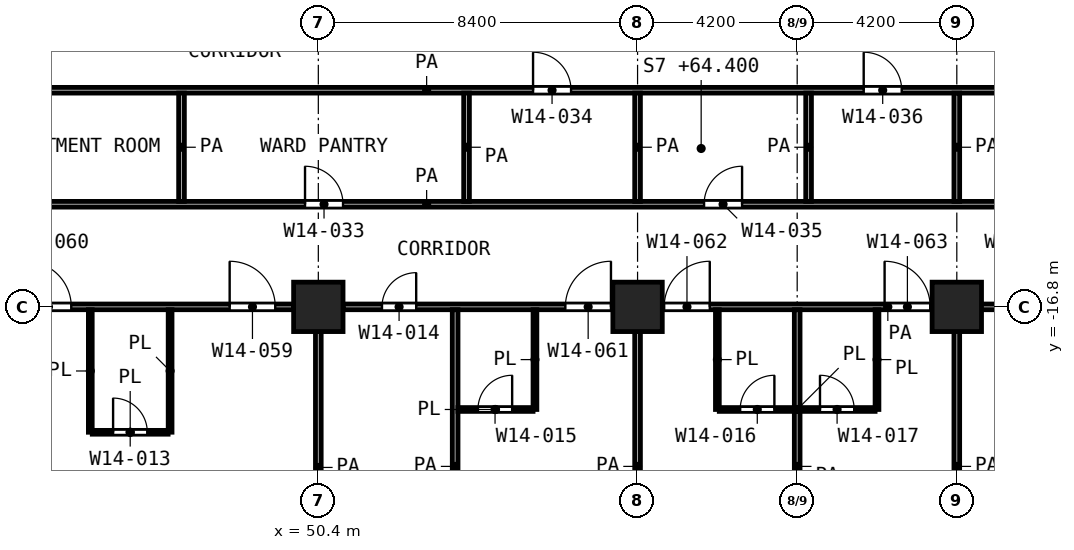
"""IFC4 building model, lengths in metres.
Left out: names, types, materials, properties, quantities, classifications, styles, units other than length and angle.
Written with IfcOpenShell. Run it as: python <this file> out.ifc"""

import sys

from ifc_helpers import new_model, si_unit, direction, frame, frame_2d, origin, origin_2d, place, context, subcontext, project, spatial, rectangle, extrude, element, fill, save


model = new_model("IFC4")
c1 = context("Model", 3, precision=1e-05, world=origin(), true_north=direction((0.0, 1.0)))
c2 = subcontext(c1, "Body", "Model", "MODEL_VIEW")
j1 = project(units=[si_unit("LENGTHUNIT", "METRE"), si_unit("PLANEANGLEUNIT", "RADIAN")], contexts=[c1])
p1 = place(None, origin())
s1 = spatial("IfcSite", under=j1, at=p1, CompositionType="ELEMENT")
p2 = place(p1, origin())
s2 = spatial("IfcBuilding", under=s1, at=p2, CompositionType="ELEMENT")
p3 = place(p2, frame((0.0, 0.0, 64.4)))
s3 = spatial("IfcBuildingStorey", under=s2, at=p3, CompositionType="ELEMENT", Elevation=64.4)
for number, where, z_axis, x_axis in (
    (1, (50.4, -16.8, 0.0), (0.0, 0.0, 1.0), (1.0, 0.0, 0.0)),
    (2, (58.8, -16.8, 0.0), (0.0, 0.0, 1.0), (1.0, 0.0, 0.0)),
    (3, (67.2, -16.8, 0.0), (0.0, 0.0, 1.0), (1.0, 0.0, 0.0)),
):
    element("IfcColumn", number, at=place(p3, frame(where, z_axis=z_axis, x_axis=x_axis)), inside=s3, PredefinedType="COLUMN", context=c2, shape_type="SweptSolid", body=[
        extrude(rectangle(XDim=1.3, YDim=1.3, at=origin_2d()), origin(), (0.0, 0.0, 1.0), 4.2),
    ])
p4 = place(p3, frame((44.452, -20.1, 0.0), z_axis=(0.0, 0.0, 1.0), x_axis=(1.0, 0.0, 0.0)))
e4 = element("IfcWall", 4, at=p4, inside=s3, PredefinedType="PARTITIONING", context=c2, shape_type="SweptSolid", body=[
    extrude(rectangle(XDim=1.996, YDim=0.1, at=frame_2d((0.998, 0.0))), origin(), (0.0, 0.0, 1.0), 3.9),
])
p5 = place(p4, frame((0.548, 0.0, 0.0)))
e5 = element("IfcOpeningElement", 5, at=p5, cuts=e4, PredefinedType="OPENING", context=c2, shape_type="SweptSolid", body=[
    extrude(rectangle(XDim=0.9, YDim=2.1, at=frame_2d((0.45, 1.05))), frame((0.0, 0.06, 0.0), z_axis=(0.0, -1.0, 0.0), x_axis=(1.0, 0.0, 0.0)), (0.0, 0.0, 1.0), 0.12),
])
p6 = place(p3, frame((54.075, -19.5, 0.0), z_axis=(0.0, 0.0, 1.0), x_axis=(1.0, 0.0, 0.0)))
e6 = element("IfcWall", 6, at=p6, inside=s3, PredefinedType="PARTITIONING", context=c2, shape_type="SweptSolid", body=[
    extrude(rectangle(XDim=1.975, YDim=0.1, at=frame_2d((0.988, 0.0))), origin(), (0.0, 0.0, 1.0), 3.9),
])
p7 = place(p6, frame((0.525, 0.0, 0.0)))
e7 = element("IfcOpeningElement", 7, at=p7, cuts=e6, PredefinedType="OPENING", context=c2, shape_type="SweptSolid", body=[
    extrude(rectangle(XDim=0.9, YDim=2.1, at=frame_2d((0.45, 1.05))), frame((0.0, 0.06, 0.0), z_axis=(0.0, -1.0, 0.0), x_axis=(1.0, 0.0, 0.0)), (0.0, 0.0, 1.0), 0.12),
])
p8 = place(p3, frame((60.95, -19.5, 0.0), z_axis=(0.0, 0.0, 1.0), x_axis=(1.0, 0.0, 0.0)))
e8 = element("IfcWall", 8, at=p8, inside=s3, PredefinedType="PARTITIONING", context=c2, shape_type="SweptSolid", body=[
    extrude(rectangle(XDim=4.1, YDim=0.1, at=frame_2d((2.05, 0.0))), origin(), (0.0, 0.0, 1.0), 3.9),
])
p9 = place(p8, frame((0.55, 0.0, 0.0)))
e9 = element("IfcOpeningElement", 9, at=p9, cuts=e8, PredefinedType="OPENING", context=c2, shape_type="SweptSolid", body=[
    extrude(rectangle(XDim=0.9, YDim=2.1, at=frame_2d((0.45, 1.05))), frame((0.0, 0.06, 0.0), z_axis=(0.0, -1.0, 0.0), x_axis=(1.0, 0.0, 0.0)), (0.0, 0.0, 1.0), 0.12),
])
p10 = place(p8, frame((2.65, 0.0, 0.0)))
e10 = element("IfcOpeningElement", 10, at=p10, cuts=e8, PredefinedType="OPENING", context=c2, shape_type="SweptSolid", body=[
    extrude(rectangle(XDim=0.9, YDim=2.1, at=frame_2d((0.45, 1.05))), frame((0.0, 0.06, 0.0), z_axis=(0.0, -1.0, 0.0), x_axis=(1.0, 0.0, 0.0)), (0.0, 0.0, 1.0), 0.12),
])
p11 = place(p3, frame((44.4, -20.099, 0.0), z_axis=(0.0, 0.0, 1.0), x_axis=(0.0, 1.0, 0.0)))
e11 = element("IfcWall", 11, at=p11, inside=s3, PredefinedType="PARTITIONING", context=c2, shape_type="SweptSolid", body=[
    extrude(rectangle(XDim=3.224, YDim=0.1, at=frame_2d((1.612, 0.0))), origin(), (0.0, 0.0, 1.0), 3.9),
])
p12 = place(p3, frame((46.5, -20.098, 0.0), z_axis=(0.0, 0.0, 1.0), x_axis=(0.0, 1.0, 0.0)))
e12 = element("IfcWall", 12, at=p12, inside=s3, PredefinedType="PARTITIONING", context=c2, shape_type="SweptSolid", body=[
    extrude(rectangle(XDim=3.223, YDim=0.1, at=frame_2d((1.611, 0.0))), origin(), (0.0, 0.0, 1.0), 3.9),
])
for number, where, z_axis, x_axis in (
    (13, (56.1, -19.5, 0.0), (0.0, 0.0, 1.0), (0.0, 1.0, 0.0)),
    (14, (60.9, -19.5, 0.0), (0.0, 0.0, 1.0), (0.0, 1.0, 0.0)),
    (15, (65.1, -19.5, 0.0), (0.0, 0.0, 1.0), (0.0, 1.0, 0.0)),
):
    element("IfcWall", number, at=place(p3, frame(where, z_axis=z_axis, x_axis=x_axis)), inside=s3, PredefinedType="PARTITIONING", context=c2, shape_type="SweptSolid", body=[
        extrude(rectangle(XDim=2.625, YDim=0.1, at=frame_2d((1.312, 0.0))), origin(), (0.0, 0.0, 1.0), 3.9),
    ])
p13 = place(p3, frame((25.1, -16.8, 0.0), z_axis=(0.0, 0.0, 1.0), x_axis=(1.0, 0.0, 0.0)))
e16 = element("IfcWall", 16, at=p13, inside=s3, PredefinedType="PARTITIONING", context=c2, shape_type="SweptSolid", body=[
    extrude(rectangle(XDim=24.65, YDim=0.15, at=frame_2d((12.325, 0.0))), origin(), (0.0, 0.0, 1.0), 3.9),
])
p14 = place(p13, frame((1.45, 0.0, 0.0)))
e17 = element("IfcOpeningElement", 17, at=p14, cuts=e16, PredefinedType="OPENING", context=c2, shape_type="SweptSolid", body=[
    extrude(rectangle(XDim=1.5, YDim=2.1, at=frame_2d((0.75, 1.05))), frame((0.0, 0.085, 0.0), z_axis=(0.0, -1.0, 0.0), x_axis=(1.0, 0.0, 0.0)), (0.0, 0.0, 1.0), 0.17),
])
p15 = place(p13, frame((5.9, 0.0, 0.0)))
e18 = element("IfcOpeningElement", 18, at=p15, cuts=e16, PredefinedType="OPENING", context=c2, shape_type="SweptSolid", body=[
    extrude(rectangle(XDim=1.0, YDim=2.1, at=frame_2d((0.5, 1.05))), frame((0.0, 0.085, 0.0), z_axis=(0.0, -1.0, 0.0), x_axis=(1.0, 0.0, 0.0)), (0.0, 0.0, 1.0), 0.17),
])
p16 = place(p13, frame((9.2, 0.0, 0.0)))
e19 = element("IfcOpeningElement", 19, at=p16, cuts=e16, PredefinedType="OPENING", context=c2, shape_type="SweptSolid", body=[
    extrude(rectangle(XDim=1.2, YDim=2.1, at=frame_2d((0.6, 1.05))), frame((0.0, 0.085, 0.0), z_axis=(0.0, -1.0, 0.0), x_axis=(1.0, 0.0, 0.0)), (0.0, 0.0, 1.0), 0.17),
])
p17 = place(p13, frame((15.0, 0.0, 0.0)))
e20 = element("IfcOpeningElement", 20, at=p17, cuts=e16, PredefinedType="OPENING", context=c2, shape_type="SweptSolid", body=[
    extrude(rectangle(XDim=1.2, YDim=2.1, at=frame_2d((0.6, 1.05))), frame((0.0, 0.085, 0.0), z_axis=(0.0, -1.0, 0.0), x_axis=(1.0, 0.0, 0.0)), (0.0, 0.0, 1.0), 0.17),
])
p18 = place(p13, frame((22.967, 0.0, 0.0)))
e21 = element("IfcOpeningElement", 21, at=p18, cuts=e16, PredefinedType="OPENING", context=c2, shape_type="SweptSolid", body=[
    extrude(rectangle(XDim=1.2, YDim=2.1, at=frame_2d((0.6, 1.05))), frame((0.0, 0.085, 0.0), z_axis=(0.0, -1.0, 0.0), x_axis=(1.0, 0.0, 0.0)), (0.0, 0.0, 1.0), 0.17),
])
p19 = place(p13, frame((17.6, 0.0, 0.0)))
e22 = element("IfcOpeningElement", 22, at=p19, cuts=e16, PredefinedType="OPENING", context=c2, shape_type="SweptSolid", body=[
    extrude(rectangle(XDim=1.2, YDim=2.1, at=frame_2d((0.6, 1.05))), frame((0.0, 0.085, 0.0), z_axis=(0.0, -1.0, 0.0), x_axis=(1.0, 0.0, 0.0)), (0.0, 0.0, 1.0), 0.17),
])
p20 = place(p3, frame((51.05, -16.8, 0.0), z_axis=(0.0, 0.0, 1.0), x_axis=(1.0, 0.0, 0.0)))
e23 = element("IfcWall", 23, at=p20, inside=s3, PredefinedType="PARTITIONING", context=c2, shape_type="SweptSolid", body=[
    extrude(rectangle(XDim=28.67, YDim=0.15, at=frame_2d((14.335, 0.0))), origin(), (0.0, 0.0, 1.0), 3.9),
])
p21 = place(p20, frame((1.025, 0.0, 0.0)))
e24 = element("IfcOpeningElement", 24, at=p21, cuts=e23, PredefinedType="OPENING", context=c2, shape_type="SweptSolid", body=[
    extrude(rectangle(XDim=0.9, YDim=2.1, at=frame_2d((0.45, 1.05))), frame((0.0, 0.085, 0.0), z_axis=(0.0, -1.0, 0.0), x_axis=(1.0, 0.0, 0.0)), (0.0, 0.0, 1.0), 0.17),
])
p22 = place(p20, frame((5.85, 0.0, 0.0)))
e25 = element("IfcOpeningElement", 25, at=p22, cuts=e23, PredefinedType="OPENING", context=c2, shape_type="SweptSolid", body=[
    extrude(rectangle(XDim=1.2, YDim=2.1, at=frame_2d((0.6, 1.05))), frame((0.0, 0.085, 0.0), z_axis=(0.0, -1.0, 0.0), x_axis=(1.0, 0.0, 0.0)), (0.0, 0.0, 1.0), 0.17),
])
p23 = place(p20, frame((8.45, 0.0, 0.0)))
e26 = element("IfcOpeningElement", 26, at=p23, cuts=e23, PredefinedType="OPENING", context=c2, shape_type="SweptSolid", body=[
    extrude(rectangle(XDim=1.2, YDim=2.1, at=frame_2d((0.6, 1.05))), frame((0.0, 0.085, 0.0), z_axis=(0.0, -1.0, 0.0), x_axis=(1.0, 0.0, 0.0)), (0.0, 0.0, 1.0), 0.17),
])
p24 = place(p20, frame((14.25, 0.0, 0.0)))
e27 = element("IfcOpeningElement", 27, at=p24, cuts=e23, PredefinedType="OPENING", context=c2, shape_type="SweptSolid", body=[
    extrude(rectangle(XDim=1.2, YDim=2.1, at=frame_2d((0.6, 1.05))), frame((0.0, 0.085, 0.0), z_axis=(0.0, -1.0, 0.0), x_axis=(1.0, 0.0, 0.0)), (0.0, 0.0, 1.0), 0.17),
])
p25 = place(p20, frame((17.35, 0.0, 0.0)))
e28 = element("IfcOpeningElement", 28, at=p25, cuts=e23, PredefinedType="OPENING", context=c2, shape_type="SweptSolid", body=[
    extrude(rectangle(XDim=1.2, YDim=2.1, at=frame_2d((0.6, 1.05))), frame((0.0, 0.085, 0.0), z_axis=(0.0, -1.0, 0.0), x_axis=(1.0, 0.0, 0.0)), (0.0, 0.0, 1.0), 0.17),
])
p26 = place(p20, frame((25.25, 0.0, 0.0)))
e29 = element("IfcOpeningElement", 29, at=p26, cuts=e23, PredefinedType="OPENING", context=c2, shape_type="SweptSolid", body=[
    extrude(rectangle(XDim=1.0, YDim=2.1, at=frame_2d((0.5, 1.05))), frame((0.0, 0.085, 0.0), z_axis=(0.0, -1.0, 0.0), x_axis=(1.0, 0.0, 0.0)), (0.0, 0.0, 1.0), 0.17),
])
p27 = place(p3, frame((29.475, -14.1, 0.0), z_axis=(0.0, 0.0, 1.0), x_axis=(1.0, 0.0, 0.0)))
e30 = element("IfcWall", 30, at=p27, inside=s3, PredefinedType="PARTITIONING", context=c2, shape_type="SweptSolid", body=[
    extrude(rectangle(XDim=47.55, YDim=0.15, at=frame_2d((23.775, 0.0))), origin(), (0.0, 0.0, 1.0), 3.9),
])
p28 = place(p27, frame((10.125, 0.0, 0.0)))
e31 = element("IfcOpeningElement", 31, at=p28, cuts=e30, PredefinedType="OPENING", context=c2, shape_type="SweptSolid", body=[
    extrude(rectangle(XDim=1.2, YDim=2.1, at=frame_2d((0.6, 1.05))), frame((0.0, 0.085, 0.0), z_axis=(0.0, -1.0, 0.0), x_axis=(1.0, 0.0, 0.0)), (0.0, 0.0, 1.0), 0.17),
])
p29 = place(p27, frame((20.575, 0.0, 0.0)))
e32 = element("IfcOpeningElement", 32, at=p29, cuts=e30, PredefinedType="OPENING", context=c2, shape_type="SweptSolid", body=[
    extrude(rectangle(XDim=1.0, YDim=2.1, at=frame_2d((0.5, 1.05))), frame((0.0, 0.085, 0.0), z_axis=(0.0, -1.0, 0.0), x_axis=(1.0, 0.0, 0.0)), (0.0, 0.0, 1.0), 0.17),
])
p30 = place(p27, frame((31.075, 0.0, 0.0)))
e33 = element("IfcOpeningElement", 33, at=p30, cuts=e30, PredefinedType="OPENING", context=c2, shape_type="SweptSolid", body=[
    extrude(rectangle(XDim=1.0, YDim=2.1, at=frame_2d((0.5, 1.05))), frame((0.0, 0.085, 0.0), z_axis=(0.0, -1.0, 0.0), x_axis=(1.0, 0.0, 0.0)), (0.0, 0.0, 1.0), 0.17),
])
p31 = place(p27, frame((42.175, 0.0, 0.0)))
e34 = element("IfcOpeningElement", 34, at=p31, cuts=e30, PredefinedType="OPENING", context=c2, shape_type="SweptSolid", body=[
    extrude(rectangle(XDim=1.0, YDim=2.1, at=frame_2d((0.5, 1.05))), frame((0.0, 0.085, 0.0), z_axis=(0.0, -1.0, 0.0), x_axis=(1.0, 0.0, 0.0)), (0.0, 0.0, 1.0), 0.17),
])
p32 = place(p3, frame((29.475, -11.1, 0.0), z_axis=(0.0, 0.0, 1.0), x_axis=(1.0, 0.0, 0.0)))
e35 = element("IfcWall", 35, at=p32, inside=s3, PredefinedType="PARTITIONING", context=c2, shape_type="SweptSolid", body=[
    extrude(rectangle(XDim=47.55, YDim=0.15, at=frame_2d((23.775, 0.0))), origin(), (0.0, 0.0, 1.0), 3.9),
])
p33 = place(p32, frame((26.575, 0.0, 0.0)))
e36 = element("IfcOpeningElement", 36, at=p33, cuts=e35, PredefinedType="OPENING", context=c2, shape_type="SweptSolid", body=[
    extrude(rectangle(XDim=1.0, YDim=2.1, at=frame_2d((0.5, 1.05))), frame((0.0, 0.085, 0.0), z_axis=(0.0, -1.0, 0.0), x_axis=(1.0, 0.0, 0.0)), (0.0, 0.0, 1.0), 0.17),
])
p34 = place(p32, frame((35.275, 0.0, 0.0)))
e37 = element("IfcOpeningElement", 37, at=p34, cuts=e35, PredefinedType="OPENING", context=c2, shape_type="SweptSolid", body=[
    extrude(rectangle(XDim=1.0, YDim=2.1, at=frame_2d((0.5, 1.05))), frame((0.0, 0.085, 0.0), z_axis=(0.0, -1.0, 0.0), x_axis=(1.0, 0.0, 0.0)), (0.0, 0.0, 1.0), 0.17),
])
p35 = place(p32, frame((2.575, 0.0, 0.0)))
e38 = element("IfcOpeningElement", 38, at=p35, cuts=e35, PredefinedType="OPENING", context=c2, shape_type="SweptSolid", body=[
    extrude(rectangle(XDim=1.0, YDim=2.1, at=frame_2d((0.5, 1.05))), frame((0.0, 0.085, 0.0), z_axis=(0.0, -1.0, 0.0), x_axis=(1.0, 0.0, 0.0)), (0.0, 0.0, 1.0), 0.17),
])
p36 = place(p3, frame((46.8, -14.025, 0.0), z_axis=(0.0, 0.0, 1.0), x_axis=(0.0, 1.0, 0.0)))
e39 = element("IfcWall", 39, at=p36, inside=s3, PredefinedType="PARTITIONING", context=c2, shape_type="SweptSolid", body=[
    extrude(rectangle(XDim=2.85, YDim=0.15, at=frame_2d((1.425, 0.0))), origin(), (0.0, 0.0, 1.0), 3.9),
])
p37 = place(p3, frame((50.4, -24.6, 0.0), z_axis=(0.0, 0.0, 1.0), x_axis=(0.0, 1.0, 0.0)))
e40 = element("IfcWall", 40, at=p37, inside=s3, PredefinedType="PARTITIONING", context=c2, shape_type="SweptSolid", body=[
    extrude(rectangle(XDim=7.15, YDim=0.15, at=frame_2d((3.575, 0.0))), origin(), (0.0, 0.0, 1.0), 3.9),
])
p38 = place(p3, frame((54.0, -25.12, 0.0), z_axis=(0.0, 0.0, 1.0), x_axis=(0.0, 1.0, 0.0)))
e41 = element("IfcWall", 41, at=p38, inside=s3, PredefinedType="PARTITIONING", context=c2, shape_type="SweptSolid", body=[
    extrude(rectangle(XDim=8.245, YDim=0.15, at=frame_2d((4.123, 0.0))), origin(), (0.0, 0.0, 1.0), 3.9),
])
p39 = place(p3, frame((54.3, -14.025, 0.0), z_axis=(0.0, 0.0, 1.0), x_axis=(0.0, 1.0, 0.0)))
e42 = element("IfcWall", 42, at=p39, inside=s3, PredefinedType="PARTITIONING", context=c2, shape_type="SweptSolid", body=[
    extrude(rectangle(XDim=2.85, YDim=0.15, at=frame_2d((1.425, 0.0))), origin(), (0.0, 0.0, 1.0), 3.9),
])
p40 = place(p3, frame((58.8, -25.12, 0.0), z_axis=(0.0, 0.0, 1.0), x_axis=(0.0, 1.0, 0.0)))
e43 = element("IfcWall", 43, at=p40, inside=s3, PredefinedType="PARTITIONING", context=c2, shape_type="SweptSolid", body=[
    extrude(rectangle(XDim=8.245, YDim=0.15, at=frame_2d((4.123, 0.0))), origin(), (0.0, 0.0, 1.0), 3.9),
])
p41 = place(p3, frame((58.8, -14.025, 0.0), z_axis=(0.0, 0.0, 1.0), x_axis=(0.0, 1.0, 0.0)))
e44 = element("IfcWall", 44, at=p41, inside=s3, PredefinedType="PARTITIONING", context=c2, shape_type="SweptSolid", body=[
    extrude(rectangle(XDim=2.85, YDim=0.15, at=frame_2d((1.425, 0.0))), origin(), (0.0, 0.0, 1.0), 3.9),
])
p42 = place(p3, frame((63.0, -25.12, 0.0), z_axis=(0.0, 0.0, 1.0), x_axis=(0.0, 1.0, 0.0)))
e45 = element("IfcWall", 45, at=p42, inside=s3, PredefinedType="PARTITIONING", context=c2, shape_type="SweptSolid", body=[
    extrude(rectangle(XDim=8.245, YDim=0.15, at=frame_2d((4.123, 0.0))), origin(), (0.0, 0.0, 1.0), 3.9),
])
p43 = place(p3, frame((63.3, -14.025, 0.0), z_axis=(0.0, 0.0, 1.0), x_axis=(0.0, 1.0, 0.0)))
e46 = element("IfcWall", 46, at=p43, inside=s3, PredefinedType="PARTITIONING", context=c2, shape_type="SweptSolid", body=[
    extrude(rectangle(XDim=2.85, YDim=0.15, at=frame_2d((1.425, 0.0))), origin(), (0.0, 0.0, 1.0), 3.9),
])
p44 = place(p3, frame((67.2, -25.12, 0.0), z_axis=(0.0, 0.0, 1.0), x_axis=(0.0, 1.0, 0.0)))
e47 = element("IfcWall", 47, at=p44, inside=s3, PredefinedType="PARTITIONING", context=c2, shape_type="SweptSolid", body=[
    extrude(rectangle(XDim=8.245, YDim=0.15, at=frame_2d((4.123, 0.0))), origin(), (0.0, 0.0, 1.0), 3.9),
])
p45 = place(p3, frame((67.2, -14.025, 0.0), z_axis=(0.0, 0.0, 1.0), x_axis=(0.0, 1.0, 0.0)))
e48 = element("IfcWall", 48, at=p45, inside=s3, PredefinedType="PARTITIONING", context=c2, shape_type="SweptSolid", body=[
    extrude(rectangle(XDim=2.85, YDim=0.15, at=frame_2d((1.425, 0.0))), origin(), (0.0, 0.0, 1.0), 3.9),
])
p46 = place(p29, origin())
e49 = element("IfcDoor", 49, at=p46, inside=s3, OperationType="SINGLE_SWING_LEFT", PredefinedType="DOOR", context=c2, shape_type="SweptSolid", body=[
    extrude(rectangle(XDim=1.0, YDim=2.1, at=frame_2d((0.5, 1.05))), frame((0.0, 0.025, 0.0), z_axis=(0.0, -1.0, 0.0), x_axis=(1.0, 0.0, 0.0)), (0.0, 0.0, 1.0), 0.05),
])
fill(e32, e49)
p47 = place(p33, origin())
e50 = element("IfcDoor", 50, at=p47, inside=s3, OperationType="SINGLE_SWING_LEFT", PredefinedType="DOOR", context=c2, shape_type="SweptSolid", body=[
    extrude(rectangle(XDim=1.0, YDim=2.1, at=frame_2d((0.5, 1.05))), frame((0.0, 0.025, 0.0), z_axis=(0.0, -1.0, 0.0), x_axis=(1.0, 0.0, 0.0)), (0.0, 0.0, 1.0), 0.05),
])
fill(e36, e50)
p48 = place(p30, origin())
e51 = element("IfcDoor", 51, at=p48, inside=s3, OperationType="SINGLE_SWING_RIGHT", PredefinedType="DOOR", context=c2, shape_type="SweptSolid", body=[
    extrude(rectangle(XDim=1.0, YDim=2.1, at=frame_2d((0.5, 1.05))), frame((0.0, 0.025, 0.0), z_axis=(0.0, -1.0, 0.0), x_axis=(1.0, 0.0, 0.0)), (0.0, 0.0, 1.0), 0.05),
])
fill(e33, e51)
p49 = place(p34, origin())
e52 = element("IfcDoor", 52, at=p49, inside=s3, OperationType="SINGLE_SWING_LEFT", PredefinedType="DOOR", context=c2, shape_type="SweptSolid", body=[
    extrude(rectangle(XDim=1.0, YDim=2.1, at=frame_2d((0.5, 1.05))), frame((0.0, 0.025, 0.0), z_axis=(0.0, -1.0, 0.0), x_axis=(1.0, 0.0, 0.0)), (0.0, 0.0, 1.0), 0.05),
])
fill(e37, e52)
p50 = place(p18, origin())
e53 = element("IfcDoor", 53, at=p50, inside=s3, OperationType="SINGLE_SWING_LEFT", PredefinedType="DOOR", context=c2, shape_type="SweptSolid", body=[
    extrude(rectangle(XDim=1.2, YDim=2.1, at=frame_2d((0.6, 1.05))), frame((0.0, 0.025, 0.0), z_axis=(0.0, -1.0, 0.0), x_axis=(1.0, 0.0, 0.0)), (0.0, 0.0, 1.0), 0.05),
])
fill(e21, e53)
p51 = place(p19, origin())
e54 = element("IfcDoor", 54, at=p51, inside=s3, OperationType="SINGLE_SWING_LEFT", PredefinedType="DOOR", context=c2, shape_type="SweptSolid", body=[
    extrude(rectangle(XDim=1.2, YDim=2.1, at=frame_2d((0.6, 1.05))), frame((0.0, 0.025, 0.0), z_axis=(0.0, -1.0, 0.0), x_axis=(1.0, 0.0, 0.0)), (0.0, 0.0, 1.0), 0.05),
])
fill(e22, e54)
p52 = place(p5, origin())
e55 = element("IfcDoor", 55, at=p52, inside=s3, OperationType="SINGLE_SWING_LEFT", PredefinedType="DOOR", context=c2, shape_type="SweptSolid", body=[
    extrude(rectangle(XDim=0.9, YDim=2.1, at=frame_2d((0.45, 1.05))), frame((0.0, 0.025, 0.0), z_axis=(0.0, -1.0, 0.0), x_axis=(1.0, 0.0, 0.0)), (0.0, 0.0, 1.0), 0.05),
])
fill(e5, e55)
p53 = place(p21, origin())
e56 = element("IfcDoor", 56, at=p53, inside=s3, OperationType="SINGLE_SWING_RIGHT", PredefinedType="DOOR", context=c2, shape_type="SweptSolid", body=[
    extrude(rectangle(XDim=0.9, YDim=2.1, at=frame_2d((0.45, 1.05))), frame((0.0, 0.025, 0.0), z_axis=(0.0, -1.0, 0.0), x_axis=(1.0, 0.0, 0.0)), (0.0, 0.0, 1.0), 0.05),
])
fill(e24, e56)
p54 = place(p22, origin())
e57 = element("IfcDoor", 57, at=p54, inside=s3, OperationType="SINGLE_SWING_RIGHT", PredefinedType="DOOR", context=c2, shape_type="SweptSolid", body=[
    extrude(rectangle(XDim=1.2, YDim=2.1, at=frame_2d((0.6, 1.05))), frame((0.0, 0.025, 0.0), z_axis=(0.0, -1.0, 0.0), x_axis=(1.0, 0.0, 0.0)), (0.0, 0.0, 1.0), 0.05),
])
fill(e25, e57)
p55 = place(p7, origin())
e58 = element("IfcDoor", 58, at=p55, inside=s3, OperationType="SINGLE_SWING_RIGHT", PredefinedType="DOOR", context=c2, shape_type="SweptSolid", body=[
    extrude(rectangle(XDim=0.9, YDim=2.1, at=frame_2d((0.45, 1.05))), frame((0.0, 0.025, 0.0), z_axis=(0.0, -1.0, 0.0), x_axis=(1.0, 0.0, 0.0)), (0.0, 0.0, 1.0), 0.05),
])
fill(e7, e58)
p56 = place(p23, origin())
e59 = element("IfcDoor", 59, at=p56, inside=s3, OperationType="SINGLE_SWING_RIGHT", PredefinedType="DOOR", context=c2, shape_type="SweptSolid", body=[
    extrude(rectangle(XDim=1.2, YDim=2.1, at=frame_2d((0.6, 1.05))), frame((0.0, 0.025, 0.0), z_axis=(0.0, -1.0, 0.0), x_axis=(1.0, 0.0, 0.0)), (0.0, 0.0, 1.0), 0.05),
])
fill(e26, e59)
p57 = place(p9, origin())
e60 = element("IfcDoor", 60, at=p57, inside=s3, OperationType="SINGLE_SWING_RIGHT", PredefinedType="DOOR", context=c2, shape_type="SweptSolid", body=[
    extrude(rectangle(XDim=0.9, YDim=2.1, at=frame_2d((0.45, 1.05))), frame((0.0, 0.025, 0.0), z_axis=(0.0, -1.0, 0.0), x_axis=(1.0, 0.0, 0.0)), (0.0, 0.0, 1.0), 0.05),
])
fill(e9, e60)
p58 = place(p24, origin())
e61 = element("IfcDoor", 61, at=p58, inside=s3, OperationType="SINGLE_SWING_LEFT", PredefinedType="DOOR", context=c2, shape_type="SweptSolid", body=[
    extrude(rectangle(XDim=1.2, YDim=2.1, at=frame_2d((0.6, 1.05))), frame((0.0, 0.025, 0.0), z_axis=(0.0, -1.0, 0.0), x_axis=(1.0, 0.0, 0.0)), (0.0, 0.0, 1.0), 0.05),
])
fill(e27, e61)
p59 = place(p10, origin())
e62 = element("IfcDoor", 62, at=p59, inside=s3, OperationType="SINGLE_SWING_LEFT", PredefinedType="DOOR", context=c2, shape_type="SweptSolid", body=[
    extrude(rectangle(XDim=0.9, YDim=2.1, at=frame_2d((0.45, 1.05))), frame((0.0, 0.025, 0.0), z_axis=(0.0, -1.0, 0.0), x_axis=(1.0, 0.0, 0.0)), (0.0, 0.0, 1.0), 0.05),
])
fill(e10, e62)
save(model, sys.argv[1])
